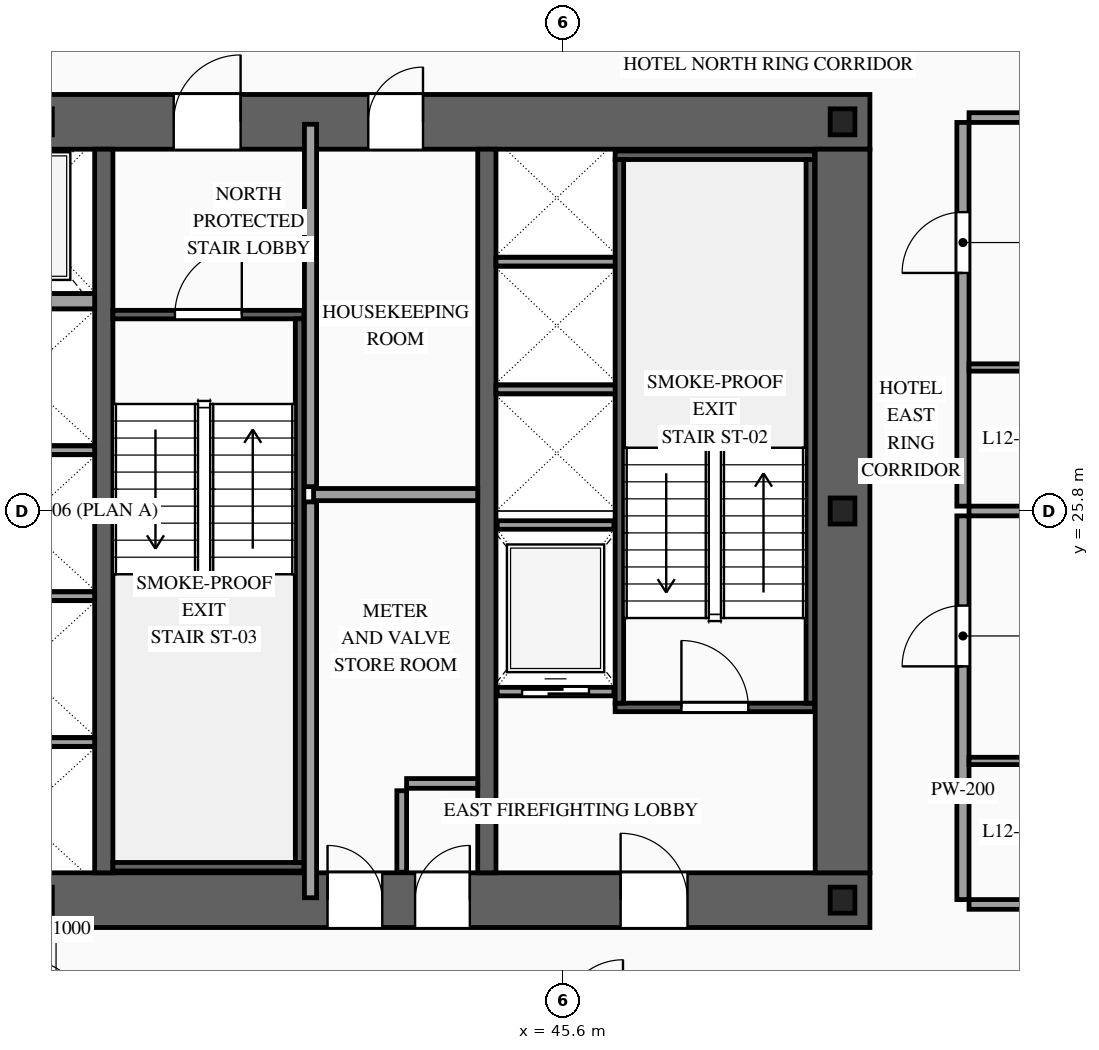
"""IFC4 building model, lengths in metres.
Left out: names, types, materials, properties, quantities, classifications, styles, units other than length and angle.
Written with IfcOpenShell. Run it as: python <this file> out.ifc"""

import sys

from ifc_helpers import new_model, si_unit, direction, frame, frame_2d, origin, origin_2d, place, context, subcontext, project, spatial, rectangle, i_section, extrude, source, transform, mapped, element, fill, save


model = new_model("IFC4")
c1 = context("Model", 3, precision=1e-05, world=origin(), true_north=direction((0.0, 1.0)))
c2 = subcontext(c1, "Body", "Model", "MODEL_VIEW")
j1 = project(units=[si_unit("LENGTHUNIT", "METRE"), si_unit("PLANEANGLEUNIT", "RADIAN")], contexts=[c1])
p1 = place(None, origin())
s1 = spatial("IfcSite", under=j1, at=p1, CompositionType="ELEMENT")
p2 = place(p1, origin())
s2 = spatial("IfcBuilding", under=s1, at=p2, CompositionType="ELEMENT")
p3 = place(p2, frame((0.0, 0.0, 49.6)))
s3 = spatial("IfcBuildingStorey", under=s2, at=p3, CompositionType="ELEMENT", Elevation=49.6)
p4 = place(p3, frame((23.35, 19.4, 0.0), z_axis=(0.0, 0.0, 1.0), x_axis=(1.0, 0.0, 0.0)))
e1 = element("IfcWall", 1, at=p4, inside=s3, PredefinedType="SHEAR", context=c2, shape_type="SweptSolid", body=[
    extrude(rectangle(XDim=27.3, YDim=0.9, at=frame_2d((13.65, 0.0))), origin(), (0.0, 0.0, 1.0), 3.6),
])
p5 = place(p4, frame((2.1, 0.0, 0.0)))
e2 = element("IfcOpeningElement", 2, at=p5, cuts=e1, PredefinedType="OPENING", context=c2, shape_type="SweptSolid", body=[
    extrude(rectangle(XDim=1.1, YDim=2.2, at=frame_2d((0.55, 1.1))), frame((0.0, 0.465, 0.0), z_axis=(0.0, -1.0, 0.0), x_axis=(1.0, 0.0, 0.0)), (0.0, 0.0, 1.0), 0.93),
])
p6 = place(p4, frame((10.0, 0.0, 0.0)))
e3 = element("IfcOpeningElement", 3, at=p6, cuts=e1, PredefinedType="OPENING", context=c2, shape_type="SweptSolid", body=[
    extrude(rectangle(XDim=1.1, YDim=2.2, at=frame_2d((0.55, 1.1))), frame((0.0, 0.465, 0.0), z_axis=(0.0, -1.0, 0.0), x_axis=(1.0, 0.0, 0.0)), (0.0, 0.0, 1.0), 0.93),
])
p7 = place(p4, frame((23.2, 0.0, 0.0)))
e4 = element("IfcOpeningElement", 4, at=p7, cuts=e1, PredefinedType="OPENING", context=c2, shape_type="SweptSolid", body=[
    extrude(rectangle(XDim=1.1, YDim=2.2, at=frame_2d((0.55, 1.1))), frame((0.0, 0.465, 0.0), z_axis=(0.0, -1.0, 0.0), x_axis=(1.0, 0.0, 0.0)), (0.0, 0.0, 1.0), 0.93),
])
p8 = place(p4, frame((19.82, 0.0, 0.0)))
e5 = element("IfcOpeningElement", 5, at=p8, cuts=e1, PredefinedType="OPENING", context=c2, shape_type="SweptSolid", body=[
    extrude(rectangle(XDim=0.9, YDim=2.15, at=frame_2d((0.45, 1.075))), frame((0.0, 0.465, 0.0), z_axis=(0.0, -1.0, 0.0), x_axis=(1.0, 0.0, 0.0)), (0.0, 0.0, 1.0), 0.93),
])
p9 = place(p4, frame((18.38, 0.0, 0.0)))
e6 = element("IfcOpeningElement", 6, at=p9, cuts=e1, PredefinedType="OPENING", context=c2, shape_type="SweptSolid", body=[
    extrude(rectangle(XDim=0.9, YDim=2.15, at=frame_2d((0.45, 1.075))), frame((0.0, 0.465, 0.0), z_axis=(0.0, -1.0, 0.0), x_axis=(1.0, 0.0, 0.0)), (0.0, 0.0, 1.0), 0.93),
])
p10 = place(p3, frame((23.35, 32.2, 0.0), z_axis=(0.0, 0.0, 1.0), x_axis=(1.0, 0.0, 0.0)))
e7 = element("IfcWall", 7, at=p10, inside=s3, PredefinedType="SHEAR", context=c2, shape_type="SweptSolid", body=[
    extrude(rectangle(XDim=27.3, YDim=0.9, at=frame_2d((13.65, 0.0))), origin(), (0.0, 0.0, 1.0), 3.6),
])
p11 = place(p10, frame((4.72, 0.0, 0.0)))
e8 = element("IfcOpeningElement", 8, at=p11, cuts=e7, PredefinedType="OPENING", context=c2, shape_type="SweptSolid", body=[
    extrude(rectangle(XDim=0.9, YDim=2.15, at=frame_2d((0.45, 1.075))), frame((0.0, 0.465, 0.0), z_axis=(0.0, -1.0, 0.0), x_axis=(1.0, 0.0, 0.0)), (0.0, 0.0, 1.0), 0.93),
])
p12 = place(p10, frame((10.0, 0.0, 0.0)))
e9 = element("IfcOpeningElement", 9, at=p12, cuts=e7, PredefinedType="OPENING", context=c2, shape_type="SweptSolid", body=[
    extrude(rectangle(XDim=1.1, YDim=2.2, at=frame_2d((0.55, 1.1))), frame((0.0, 0.465, 0.0), z_axis=(0.0, -1.0, 0.0), x_axis=(1.0, 0.0, 0.0)), (0.0, 0.0, 1.0), 0.93),
])
p13 = place(p10, frame((15.85, 0.0, 0.0)))
e10 = element("IfcOpeningElement", 10, at=p13, cuts=e7, PredefinedType="OPENING", context=c2, shape_type="SweptSolid", body=[
    extrude(rectangle(XDim=1.1, YDim=2.2, at=frame_2d((0.55, 1.1))), frame((0.0, 0.465, 0.0), z_axis=(0.0, -1.0, 0.0), x_axis=(1.0, 0.0, 0.0)), (0.0, 0.0, 1.0), 0.93),
])
p14 = place(p10, frame((19.05, 0.0, 0.0)))
e11 = element("IfcOpeningElement", 11, at=p14, cuts=e7, PredefinedType="OPENING", context=c2, shape_type="SweptSolid", body=[
    extrude(rectangle(XDim=0.9, YDim=2.15, at=frame_2d((0.45, 1.075))), frame((0.0, 0.465, 0.0), z_axis=(0.0, -1.0, 0.0), x_axis=(1.0, 0.0, 0.0)), (0.0, 0.0, 1.0), 0.93),
])
m1 = source(origin(), c2, "Body", "SweptSolid", [
    extrude(rectangle(XDim=11.9, YDim=0.9, at=frame_2d((5.95, 0.0))), origin(), (0.0, 0.0, 1.0), 3.6),
])
p15 = place(p3, frame((50.2, 19.85, 0.0), z_axis=(0.0, 0.0, 1.0), x_axis=(0.0, 1.0, 0.0)))
e12 = element("IfcWall", 12, at=p15, inside=s3, PredefinedType="SHEAR", context=c2, shape_type="MappedRepresentation", body=[
    mapped(m1, transform((0.0, 0.0, 0.0), scale=1.0)),
])
m2 = source(origin(), c2, "Body", "SweptSolid", [
    extrude(rectangle(XDim=11.9, YDim=0.3, at=frame_2d((5.95, 0.0))), origin(), (0.0, 0.0, 1.0), 3.6),
])
for number, where, z_axis, x_axis in (
    (13, (38.05, 19.85, 0.0), (0.0, 0.0, 1.0), (0.0, 1.0, 0.0)),
    (14, (44.35, 19.85, 0.0), (0.0, 0.0, 1.0), (0.0, 1.0, 0.0)),
):
    element("IfcWall", number, at=place(p3, frame(where, z_axis=z_axis, x_axis=x_axis)), inside=s3, PredefinedType="SOLIDWALL", context=c2, shape_type="MappedRepresentation", body=[
        mapped(m2, transform((0.0, 0.0, 0.0), scale=1.0)),
    ])
m3 = source(origin(), c2, "Body", "SweptSolid", [
    extrude(i_section(OverallWidth=0.407, OverallDepth=0.428, WebThickness=0.02, FlangeThickness=0.035, at=origin_2d()), origin(), (0.0, 0.0, 1.0), 3.6),
])
for number, where, z_axis, x_axis in (
    (15, (37.0, 19.4, 0.0), (0.0, 0.0, 1.0), (1.0, 0.0, 0.0)),
    (16, (50.2, 19.4, 0.0), (0.0, 0.0, 1.0), (1.0, 0.0, 0.0)),
    (17, (50.2, 25.8, 0.0), (0.0, 0.0, 1.0), (1.0, 0.0, 0.0)),
    (18, (37.0, 32.2, 0.0), (0.0, 0.0, 1.0), (1.0, 0.0, 0.0)),
    (19, (50.2, 32.2, 0.0), (0.0, 0.0, 1.0), (1.0, 0.0, 0.0)),
):
    element("IfcColumn", number, at=place(p3, frame(where, z_axis=z_axis, x_axis=x_axis)), inside=s3, PredefinedType="COLUMN", context=c2, shape_type="MappedRepresentation", body=[
        mapped(m3, transform((0.0, 0.0, 0.0), scale=1.0)),
    ])
p16 = place(p3, frame((44.52, 22.83, 0.0), z_axis=(0.0, 0.0, 1.0), x_axis=(1.0, 0.0, 0.0)))
e20 = element("IfcWall", 20, at=p16, inside=s3, PredefinedType="SOLIDWALL", context=c2, shape_type="SweptSolid", body=[
    extrude(rectangle(XDim=1.92, YDim=0.14, at=frame_2d((0.96, 0.0))), origin(), (0.0, 0.0, 1.0), 3.38),
])
p17 = place(p16, frame((0.41, 0.0, 0.0)))
e21 = element("IfcOpeningElement", 21, at=p17, cuts=e20, PredefinedType="OPENING", context=c2, shape_type="SweptSolid", body=[
    extrude(rectangle(XDim=1.1, YDim=2.2, at=frame_2d((0.55, 1.1))), frame((0.0, 0.085, 0.0), z_axis=(0.0, -1.0, 0.0), x_axis=(1.0, 0.0, 0.0)), (0.0, 0.0, 1.0), 0.17),
])
m4 = source(origin(), c2, "Body", "SweptSolid", [
    extrude(rectangle(XDim=1.92, YDim=0.14, at=frame_2d((0.96, 0.0))), origin(), (0.0, 0.0, 1.0), 3.38),
])
p18 = place(p3, frame((44.52, 25.57, 0.0), z_axis=(0.0, 0.0, 1.0), x_axis=(1.0, 0.0, 0.0)))
e22 = element("IfcWall", 22, at=p18, inside=s3, PredefinedType="SOLIDWALL", context=c2, shape_type="MappedRepresentation", body=[
    mapped(m4, transform((0.0, 0.0, 0.0), scale=1.0)),
])
m5 = source(origin(), c2, "Body", "SweptSolid", [
    extrude(rectangle(XDim=2.4, YDim=0.14, at=frame_2d((1.2, 0.0))), origin(), (0.0, 0.0, 1.0), 3.38),
])
for number, where, z_axis, x_axis in (
    (23, (35.5, 22.0, 0.0), (0.0, 0.0, 1.0), (1.0, 0.0, 0.0)),
    (24, (35.5, 24.4, 0.0), (0.0, 0.0, 1.0), (1.0, 0.0, 0.0)),
    (25, (35.5, 26.8, 0.0), (0.0, 0.0, 1.0), (1.0, 0.0, 0.0)),
):
    element("IfcWall", number, at=place(p3, frame(where, z_axis=z_axis, x_axis=x_axis)), inside=s3, PredefinedType="SOLIDWALL", context=c2, shape_type="MappedRepresentation", body=[
        mapped(m5, transform((0.0, 0.0, 0.0), scale=1.0)),
    ])
m6 = source(origin(), c2, "Body", "SweptSolid", [
    extrude(rectangle(XDim=2.4, YDim=0.25, at=frame_2d((1.2, 0.0))), origin(), (0.0, 0.0, 1.0), 3.38),
])
p19 = place(p3, frame((35.5, 29.25, 0.0), z_axis=(0.0, 0.0, 1.0), x_axis=(1.0, 0.0, 0.0)))
e26 = element("IfcWall", 26, at=p19, inside=s3, PredefinedType="SOLIDWALL", context=c2, shape_type="MappedRepresentation", body=[
    mapped(m6, transform((0.0, 0.0, 0.0), scale=1.0)),
])
m7 = source(origin(), c2, "Body", "SweptSolid", [
    extrude(rectangle(XDim=2.0, YDim=0.14, at=frame_2d((1.0, 0.0))), origin(), (0.0, 0.0, 1.0), 3.38),
])
for number, where, z_axis, x_axis in (
    (27, (44.5, 27.8, 0.0), (0.0, 0.0, 1.0), (1.0, 0.0, 0.0)),
    (28, (44.5, 29.9, 0.0), (0.0, 0.0, 1.0), (1.0, 0.0, 0.0)),
):
    element("IfcWall", number, at=place(p3, frame(where, z_axis=z_axis, x_axis=x_axis)), inside=s3, PredefinedType="SOLIDWALL", context=c2, shape_type="MappedRepresentation", body=[
        mapped(m7, transform((0.0, 0.0, 0.0), scale=1.0)),
    ])
p20 = place(p3, frame((46.46, 22.57, 0.0), z_axis=(0.0, 0.0, 1.0), x_axis=(1.0, 0.0, 0.0)))
e29 = element("IfcWall", 29, at=p20, inside=s3, PredefinedType="SOLIDWALL", context=c2, shape_type="SweptSolid", body=[
    extrude(rectangle(XDim=3.28, YDim=0.14, at=frame_2d((1.64, 0.0))), origin(), (0.0, 0.0, 1.0), 3.38),
])
p21 = place(p20, frame((1.09, 0.0, 0.0)))
e30 = element("IfcOpeningElement", 30, at=p21, cuts=e29, PredefinedType="OPENING", context=c2, shape_type="SweptSolid", body=[
    extrude(rectangle(XDim=1.1, YDim=2.2, at=frame_2d((0.55, 1.1))), frame((0.0, 0.085, 0.0), z_axis=(0.0, -1.0, 0.0), x_axis=(1.0, 0.0, 0.0)), (0.0, 0.0, 1.0), 0.17),
])
m8 = source(origin(), c2, "Body", "SweptSolid", [
    extrude(rectangle(XDim=3.28, YDim=0.14, at=frame_2d((1.64, 0.0))), origin(), (0.0, 0.0, 1.0), 3.38),
])
p22 = place(p3, frame((46.46, 31.65, 0.0), z_axis=(0.0, 0.0, 1.0), x_axis=(1.0, 0.0, 0.0)))
e31 = element("IfcWall", 31, at=p22, inside=s3, PredefinedType="SOLIDWALL", context=c2, shape_type="MappedRepresentation", body=[
    mapped(m8, transform((0.0, 0.0, 0.0), scale=1.0)),
])
m9 = source(origin(), c2, "Body", "SweptSolid", [
    extrude(rectangle(XDim=8.94, YDim=0.14, at=frame_2d((4.47, 0.0))), origin(), (0.0, 0.0, 1.0), 3.38),
])
for number, where, z_axis, x_axis in (
    (32, (46.53, 22.64, 0.0), (0.0, 0.0, 1.0), (0.0, 1.0, 0.0)),
    (33, (49.67, 22.64, 0.0), (0.0, 0.0, 1.0), (0.0, 1.0, 0.0)),
):
    element("IfcWall", number, at=place(p3, frame(where, z_axis=z_axis, x_axis=x_axis)), inside=s3, PredefinedType="SOLIDWALL", context=c2, shape_type="MappedRepresentation", body=[
        mapped(m9, transform((0.0, 0.0, 0.0), scale=1.0)),
    ])
p23 = place(p3, frame((38.2, 29.03, 0.0), z_axis=(0.0, 0.0, 1.0), x_axis=(1.0, 0.0, 0.0)))
e34 = element("IfcWall", 34, at=p23, inside=s3, PredefinedType="SOLIDWALL", context=c2, shape_type="SweptSolid", body=[
    extrude(rectangle(XDim=3.14, YDim=0.14, at=frame_2d((1.57, 0.0))), origin(), (0.0, 0.0, 1.0), 3.38),
])
p24 = place(p23, frame((1.02, 0.0, 0.0)))
e35 = element("IfcOpeningElement", 35, at=p24, cuts=e34, PredefinedType="OPENING", context=c2, shape_type="SweptSolid", body=[
    extrude(rectangle(XDim=1.1, YDim=2.2, at=frame_2d((0.55, 1.1))), frame((0.0, 0.085, 0.0), z_axis=(0.0, -1.0, 0.0), x_axis=(1.0, 0.0, 0.0)), (0.0, 0.0, 1.0), 0.17),
])
m10 = source(origin(), c2, "Body", "SweptSolid", [
    extrude(rectangle(XDim=3.14, YDim=0.14, at=frame_2d((1.57, 0.0))), origin(), (0.0, 0.0, 1.0), 3.38),
])
p25 = place(p3, frame((38.2, 19.95, 0.0), z_axis=(0.0, 0.0, 1.0), x_axis=(1.0, 0.0, 0.0)))
e36 = element("IfcWall", 36, at=p25, inside=s3, PredefinedType="SOLIDWALL", context=c2, shape_type="MappedRepresentation", body=[
    mapped(m10, transform((0.0, 0.0, 0.0), scale=1.0)),
])
m11 = source(origin(), c2, "Body", "SweptSolid", [
    extrude(rectangle(XDim=8.94, YDim=0.14, at=frame_2d((4.47, 0.0))), origin(), (0.0, 0.0, 1.0), 3.38),
])
p26 = place(p3, frame((41.27, 20.02, 0.0), z_axis=(0.0, 0.0, 1.0), x_axis=(0.0, 1.0, 0.0)))
e37 = element("IfcWall", 37, at=p26, inside=s3, PredefinedType="SOLIDWALL", context=c2, shape_type="MappedRepresentation", body=[
    mapped(m11, transform((0.0, 0.0, 0.0), scale=1.0)),
])
m12 = source(origin(), c2, "Body", "SweptSolid", [
    extrude(rectangle(XDim=1.34, YDim=0.16, at=frame_2d((0.67, 0.0))), origin(), (0.0, 0.0, 1.0), 3.38),
])
p27 = place(p3, frame((42.95, 19.86, 0.0), z_axis=(0.0, 0.0, 1.0), x_axis=(0.0, 1.0, 0.0)))
e38 = element("IfcWall", 38, at=p27, inside=s3, PredefinedType="PARTITIONING", context=c2, shape_type="MappedRepresentation", body=[
    mapped(m12, transform((0.0, 0.0, 0.0), scale=1.0)),
])
m13 = source(origin(), c2, "Body", "SweptSolid", [
    extrude(rectangle(XDim=1.17, YDim=0.16, at=frame_2d((0.585, 0.0))), origin(), (0.0, 0.0, 1.0), 3.38),
])
p28 = place(p3, frame((43.03, 21.32, 0.0), z_axis=(0.0, 0.0, 1.0), x_axis=(1.0, 0.0, 0.0)))
e39 = element("IfcWall", 39, at=p28, inside=s3, PredefinedType="PARTITIONING", context=c2, shape_type="MappedRepresentation", body=[
    mapped(m13, transform((0.0, 0.0, 0.0), scale=1.0)),
])
m14 = source(origin(), c2, "Body", "SweptSolid", [
    extrude(rectangle(XDim=6.51, YDim=0.2, at=frame_2d((3.255, 0.0))), origin(), (0.0, 0.0, 1.0), 3.38),
])
p29 = place(p3, frame((41.45, 19.44, 0.0), z_axis=(0.0, 0.0, 1.0), x_axis=(0.0, 1.0, 0.0)))
e40 = element("IfcWall", 40, at=p29, inside=s3, PredefinedType="PARTITIONING", context=c2, shape_type="MappedRepresentation", body=[
    mapped(m14, transform((0.0, 0.0, 0.0), scale=1.0)),
])
m15 = source(origin(), c2, "Body", "SweptSolid", [
    extrude(rectangle(XDim=2.7, YDim=0.2, at=frame_2d((1.35, 0.0))), origin(), (0.0, 0.0, 1.0), 3.38),
])
p30 = place(p3, frame((41.5, 26.07, 0.0), z_axis=(0.0, 0.0, 1.0), x_axis=(1.0, 0.0, 0.0)))
e41 = element("IfcWall", 41, at=p30, inside=s3, PredefinedType="PARTITIONING", context=c2, shape_type="MappedRepresentation", body=[
    mapped(m15, transform((0.0, 0.0, 0.0), scale=1.0)),
])
m16 = source(origin(), c2, "Body", "SweptSolid", [
    extrude(rectangle(XDim=5.96, YDim=0.2, at=frame_2d((2.98, 0.0))), origin(), (0.0, 0.0, 1.0), 3.38),
])
p31 = place(p3, frame((41.45, 26.2, 0.0), z_axis=(0.0, 0.0, 1.0), x_axis=(0.0, 1.0, 0.0)))
e42 = element("IfcWall", 42, at=p31, inside=s3, PredefinedType="PARTITIONING", context=c2, shape_type="MappedRepresentation", body=[
    mapped(m16, transform((0.0, 0.0, 0.0), scale=1.0)),
])
p32 = place(p3, frame((52.18, 19.41, 0.0), z_axis=(0.0, 0.0, 1.0), x_axis=(0.0, 1.0, 0.0)))
e43 = element("IfcWall", 43, at=p32, inside=s3, PredefinedType="PARTITIONING", context=c2, shape_type="SweptSolid", body=[
    extrude(rectangle(XDim=6.31, YDim=0.2, at=frame_2d((3.155, 0.0))), origin(), (0.0, 0.0, 1.0), 3.38),
])
p33 = place(p32, frame((3.835, 0.0, 0.0)))
e44 = element("IfcOpeningElement", 44, at=p33, cuts=e43, PredefinedType="OPENING", context=c2, shape_type="SweptSolid", body=[
    extrude(rectangle(XDim=1.0, YDim=2.2, at=frame_2d((0.5, 1.1))), frame((0.0, 0.115, 0.0), z_axis=(0.0, -1.0, 0.0), x_axis=(1.0, 0.0, 0.0)), (0.0, 0.0, 1.0), 0.23),
])
m17 = source(origin(), c2, "Body", "SweptSolid", [
    extrude(rectangle(XDim=9.67, YDim=0.16, at=frame_2d((4.835, 0.0))), origin(), (0.0, 0.0, 1.0), 2.575),
])
p34 = place(p3, frame((52.28, 25.8, 0.0), z_axis=(0.0, 0.0, 1.0), x_axis=(1.0, 0.0, 0.0)))
e45 = element("IfcWall", 45, at=p34, inside=s3, PredefinedType="PARTITIONING", context=c2, shape_type="MappedRepresentation", body=[
    mapped(m17, transform((0.0, 0.0, 0.0), scale=1.0)),
])
m18 = source(origin(), c2, "Body", "SweptSolid", [
    extrude(rectangle(XDim=9.67, YDim=0.16, at=frame_2d((4.835, 0.0))), origin(), (0.0, 0.0, 1.0), 2.875),
])
p35 = place(p3, frame((52.28, 19.33, 0.0), z_axis=(0.0, 0.0, 1.0), x_axis=(1.0, 0.0, 0.0)))
e46 = element("IfcWall", 46, at=p35, inside=s3, PredefinedType="PARTITIONING", context=c2, shape_type="MappedRepresentation", body=[
    mapped(m18, transform((0.0, 0.0, 0.0), scale=1.0)),
])
m19 = source(origin(), c2, "Body", "SweptSolid", [
    extrude(rectangle(XDim=2.22, YDim=0.12, at=frame_2d((1.11, 0.0))), origin(), (0.0, 0.0, 1.0), 3.38),
])
p36 = place(p3, frame((52.28, 21.69, 0.0), z_axis=(0.0, 0.0, 1.0), x_axis=(1.0, 0.0, 0.0)))
e47 = element("IfcWall", 47, at=p36, inside=s3, PredefinedType="PARTITIONING", context=c2, shape_type="MappedRepresentation", body=[
    mapped(m19, transform((0.0, 0.0, 0.0), scale=1.0)),
])
p37 = place(p3, frame((52.18, 25.88, 0.0), z_axis=(0.0, 0.0, 1.0), x_axis=(0.0, 1.0, 0.0)))
e48 = element("IfcWall", 48, at=p37, inside=s3, PredefinedType="PARTITIONING", context=c2, shape_type="SweptSolid", body=[
    extrude(rectangle(XDim=6.31, YDim=0.2, at=frame_2d((3.155, 0.0))), origin(), (0.0, 0.0, 1.0), 3.38),
])
p38 = place(p37, frame((3.835, 0.0, 0.0)))
e49 = element("IfcOpeningElement", 49, at=p38, cuts=e48, PredefinedType="OPENING", context=c2, shape_type="SweptSolid", body=[
    extrude(rectangle(XDim=1.0, YDim=2.2, at=frame_2d((0.5, 1.1))), frame((0.0, 0.115, 0.0), z_axis=(0.0, -1.0, 0.0), x_axis=(1.0, 0.0, 0.0)), (0.0, 0.0, 1.0), 0.23),
])
p39 = place(p3, frame((52.28, 32.27, 0.0), z_axis=(0.0, 0.0, 1.0), x_axis=(1.0, 0.0, 0.0)))
e50 = element("IfcWall", 50, at=p39, inside=s3, PredefinedType="PARTITIONING", context=c2, shape_type="MappedRepresentation", body=[
    mapped(m18, transform((0.0, 0.0, 0.0), scale=1.0)),
])
p40 = place(p3, frame((52.28, 28.16, 0.0), z_axis=(0.0, 0.0, 1.0), x_axis=(1.0, 0.0, 0.0)))
e51 = element("IfcWall", 51, at=p40, inside=s3, PredefinedType="PARTITIONING", context=c2, shape_type="MappedRepresentation", body=[
    mapped(m19, transform((0.0, 0.0, 0.0), scale=1.0)),
])
m20 = source(origin(), c2, "Body", "SweptSolid", [
    extrude(rectangle(XDim=1.1, YDim=2.2, at=frame_2d((0.55, 1.1))), frame((0.0, 0.025, 0.0), z_axis=(0.0, -1.0, 0.0), x_axis=(1.0, 0.0, 0.0)), (0.0, 0.0, 1.0), 0.05),
])
p41 = place(p17, origin())
e52 = element("IfcDoor", 52, at=p41, inside=s3, OperationType="SLIDING_TO_RIGHT", PredefinedType="DOOR", context=c2, shape_type="MappedRepresentation", body=[
    mapped(m20, transform((0.0, 0.0, 0.0), scale=1.0)),
])
fill(e21, e52)
m21 = source(origin(), c2, "Body", "SweptSolid", [
    extrude(rectangle(XDim=1.1, YDim=2.2, at=frame_2d((0.55, 1.1))), frame((0.0, 0.025, 0.0), z_axis=(0.0, -1.0, 0.0), x_axis=(1.0, 0.0, 0.0)), (0.0, 0.0, 1.0), 0.05),
])
p42 = place(p21, origin())
e53 = element("IfcDoor", 53, at=p42, inside=s3, OperationType="SINGLE_SWING_LEFT", PredefinedType="DOOR", context=c2, shape_type="MappedRepresentation", body=[
    mapped(m21, transform((0.0, 0.0, 0.0), scale=1.0)),
])
fill(e30, e53)
p43 = place(p24, origin())
e54 = element("IfcDoor", 54, at=p43, inside=s3, OperationType="SINGLE_SWING_RIGHT", PredefinedType="DOOR", context=c2, shape_type="MappedRepresentation", body=[
    mapped(m21, transform((0.0, 0.0, 0.0), scale=1.0)),
])
fill(e35, e54)
p44 = place(p7, origin())
e55 = element("IfcDoor", 55, at=p44, inside=s3, OperationType="SINGLE_SWING_LEFT", PredefinedType="DOOR", context=c2, shape_type="MappedRepresentation", body=[
    mapped(m21, transform((0.0, 0.0, 0.0), scale=1.0)),
])
fill(e4, e55)
p45 = place(p13, origin())
e56 = element("IfcDoor", 56, at=p45, inside=s3, OperationType="SINGLE_SWING_RIGHT", PredefinedType="DOOR", context=c2, shape_type="MappedRepresentation", body=[
    mapped(m21, transform((0.0, 0.0, 0.0), scale=1.0)),
])
fill(e10, e56)
m22 = source(origin(), c2, "Body", "SweptSolid", [
    extrude(rectangle(XDim=0.9, YDim=2.15, at=frame_2d((0.45, 1.075))), frame((0.0, 0.025, 0.0), z_axis=(0.0, -1.0, 0.0), x_axis=(1.0, 0.0, 0.0)), (0.0, 0.0, 1.0), 0.05),
])
p46 = place(p8, origin())
e57 = element("IfcDoor", 57, at=p46, inside=s3, OperationType="SINGLE_SWING_RIGHT", PredefinedType="DOOR", context=c2, shape_type="MappedRepresentation", body=[
    mapped(m22, transform((0.0, 0.0, 0.0), scale=1.0)),
])
fill(e5, e57)
p47 = place(p9, origin())
e58 = element("IfcDoor", 58, at=p47, inside=s3, OperationType="SINGLE_SWING_LEFT", PredefinedType="DOOR", context=c2, shape_type="MappedRepresentation", body=[
    mapped(m22, transform((0.0, 0.0, 0.0), scale=1.0)),
])
fill(e6, e58)
p48 = place(p14, origin())
e59 = element("IfcDoor", 59, at=p48, inside=s3, OperationType="SINGLE_SWING_RIGHT", PredefinedType="DOOR", context=c2, shape_type="MappedRepresentation", body=[
    mapped(m22, transform((0.0, 0.0, 0.0), scale=1.0)),
])
fill(e11, e59)
m23 = source(origin(), c2, "Body", "SweptSolid", [
    extrude(rectangle(XDim=1.0, YDim=2.2, at=frame_2d((0.5, 1.1))), frame((0.0, 0.025, 0.0), z_axis=(0.0, -1.0, 0.0), x_axis=(1.0, 0.0, 0.0)), (0.0, 0.0, 1.0), 0.05),
])
p49 = place(p33, origin())
e60 = element("IfcDoor", 60, at=p49, inside=s3, OperationType="SINGLE_SWING_LEFT", PredefinedType="DOOR", context=c2, shape_type="MappedRepresentation", body=[
    mapped(m23, transform((0.0, 0.0, 0.0), scale=1.0)),
])
fill(e44, e60)
p50 = place(p38, origin())
e61 = element("IfcDoor", 61, at=p50, inside=s3, OperationType="SINGLE_SWING_LEFT", PredefinedType="DOOR", context=c2, shape_type="MappedRepresentation", body=[
    mapped(m23, transform((0.0, 0.0, 0.0), scale=1.0)),
])
fill(e49, e61)
save(model, sys.argv[1])
